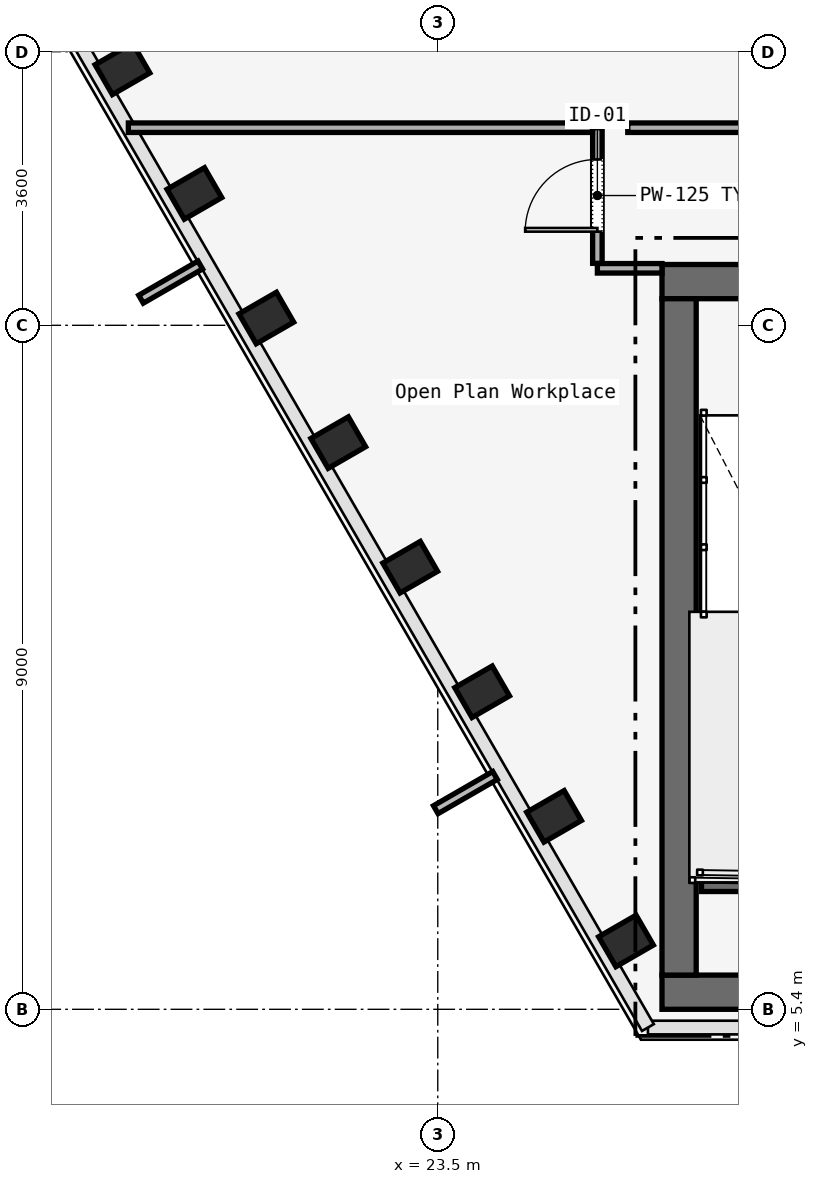
"""IFC4 building model, lengths in metres.
Left out: names, types, materials, properties, quantities, classifications, styles, units other than length and angle.
Written with IfcOpenShell. Run it as: python <this file> out.ifc"""

import sys

from ifc_helpers import new_model, si_unit, direction, frame, frame_2d, origin, origin_2d, place, context, subcontext, project, spatial, rectangle, i_section, extrude, element, fill, save


model = new_model("IFC4")
c1 = context("Model", 3, precision=1e-05, world=origin(), true_north=direction((0.0, 1.0)))
c2 = subcontext(c1, "Body", "Model", "MODEL_VIEW")
j1 = project(units=[si_unit("LENGTHUNIT", "METRE"), si_unit("PLANEANGLEUNIT", "RADIAN")], contexts=[c1])
p1 = place(None, origin())
s1 = spatial("IfcSite", under=j1, at=p1, CompositionType="ELEMENT")
p2 = place(p1, origin())
s2 = spatial("IfcBuilding", under=s1, at=p2, CompositionType="ELEMENT")
p3 = place(p2, frame((0.0, 0.0, 58.8)))
s3 = spatial("IfcBuildingStorey", under=s2, at=p3, CompositionType="ELEMENT", Elevation=58.8)
p4 = place(p3, frame((26.45, 14.975, 0.0), z_axis=(0.0, 0.0, 1.0), x_axis=(1.0, 0.0, 0.0)))
e1 = element("IfcWall", 1, at=p4, inside=s3, PredefinedType="SOLIDWALL", context=c2, shape_type="SweptSolid", body=[
    extrude(rectangle(XDim=31.1, YDim=0.45, at=frame_2d((15.55, 0.0))), origin(), (0.0, 0.0, 1.0), 3.58),
])
p5 = place(p4, frame((1.65, 0.0, 0.0)))
e2 = element("IfcOpeningElement", 2, at=p5, cuts=e1, PredefinedType="OPENING", context=c2, shape_type="SweptSolid", body=[
    extrude(rectangle(XDim=1.1, YDim=2.2, at=frame_2d((0.55, 1.1))), frame((0.0, 0.225, 0.0), z_axis=(0.0, -1.0, 0.0), x_axis=(1.0, 0.0, 0.0)), (0.0, 0.0, 1.0), 0.45),
])
p6 = place(p4, frame((13.65, 0.0, 0.0)))
e3 = element("IfcOpeningElement", 3, at=p6, cuts=e1, PredefinedType="OPENING", context=c2, shape_type="SweptSolid", body=[
    extrude(rectangle(XDim=1.1, YDim=2.2, at=frame_2d((0.55, 1.1))), frame((0.0, 0.225, 0.0), z_axis=(0.0, -1.0, 0.0), x_axis=(1.0, 0.0, 0.0)), (0.0, 0.0, 1.0), 0.45),
])
p7 = place(p4, frame((25.55, 0.0, 0.0)))
e4 = element("IfcOpeningElement", 4, at=p7, cuts=e1, PredefinedType="OPENING", context=c2, shape_type="SweptSolid", body=[
    extrude(rectangle(XDim=1.1, YDim=2.2, at=frame_2d((0.55, 1.1))), frame((0.0, 0.225, 0.0), z_axis=(0.0, -1.0, 0.0), x_axis=(1.0, 0.0, 0.0)), (0.0, 0.0, 1.0), 0.45),
])
p8 = place(p4, frame((10.7, 0.0, 0.0)))
e5 = element("IfcOpeningElement", 5, at=p8, cuts=e1, PredefinedType="OPENING", context=c2, shape_type="SweptSolid", body=[
    extrude(rectangle(XDim=1.4, YDim=2.2, at=frame_2d((0.7, 1.1))), frame((0.0, 0.225, 0.0), z_axis=(0.0, -1.0, 0.0), x_axis=(1.0, 0.0, 0.0)), (0.0, 0.0, 1.0), 0.45),
])
p9 = place(p4, frame((19.35, 0.0, 0.0)))
e6 = element("IfcOpeningElement", 6, at=p9, cuts=e1, PredefinedType="OPENING", context=c2, shape_type="SweptSolid", body=[
    extrude(rectangle(XDim=1.1, YDim=2.2, at=frame_2d((0.55, 1.1))), frame((0.0, 0.225, 0.0), z_axis=(0.0, -1.0, 0.0), x_axis=(1.0, 0.0, 0.0)), (0.0, 0.0, 1.0), 0.45),
])
p10 = place(p4, frame((21.4, 0.0, 0.0)))
e7 = element("IfcOpeningElement", 7, at=p10, cuts=e1, PredefinedType="OPENING", context=c2, shape_type="SweptSolid", body=[
    extrude(rectangle(XDim=0.9, YDim=2.1, at=frame_2d((0.45, 1.05))), frame((0.0, 0.225, 0.0), z_axis=(0.0, -1.0, 0.0), x_axis=(1.0, 0.0, 0.0)), (0.0, 0.0, 1.0), 0.45),
])
p11 = place(p4, frame((23.35, 0.0, 0.0)))
e8 = element("IfcOpeningElement", 8, at=p11, cuts=e1, PredefinedType="OPENING", context=c2, shape_type="SweptSolid", body=[
    extrude(rectangle(XDim=1.3, YDim=2.3, at=frame_2d((0.65, 1.15))), frame((0.0, 0.225, 0.0), z_axis=(0.0, -1.0, 0.0), x_axis=(1.0, 0.0, 0.0)), (0.0, 0.0, 1.0), 0.45),
])
p12 = place(p3, frame((26.45, 5.625, 0.0), z_axis=(0.0, 0.0, 1.0), x_axis=(1.0, 0.0, 0.0)))
e9 = element("IfcWall", 9, at=p12, inside=s3, PredefinedType="SOLIDWALL", context=c2, shape_type="SweptSolid", body=[
    extrude(rectangle(XDim=31.1, YDim=0.45, at=frame_2d((15.55, 0.0))), origin(), (0.0, 0.0, 1.0), 3.58),
])
p13 = place(p3, frame((26.675, 5.85, 0.0), z_axis=(0.0, 0.0, 1.0), x_axis=(0.0, 1.0, 0.0)))
e10 = element("IfcWall", 10, at=p13, inside=s3, PredefinedType="SOLIDWALL", context=c2, shape_type="SweptSolid", body=[
    extrude(rectangle(XDim=8.9, YDim=0.45, at=frame_2d((4.45, 0.0))), origin(), (0.0, 0.0, 1.0), 3.58),
])
for number, where, z_axis, x_axis in (
    (11, (19.352, 17.774, 0.0), (0.0, 0.0, 1.0), (-0.5, 0.866, 0.0)),
    (12, (20.298, 16.135, 0.0), (0.0, 0.0, 1.0), (-0.5, 0.866, 0.0)),
    (13, (21.244, 14.496, 0.0), (0.0, 0.0, 1.0), (-0.5, 0.866, 0.0)),
    (14, (22.191, 12.857, 0.0), (0.0, 0.0, 1.0), (-0.5, 0.866, 0.0)),
    (15, (23.137, 11.217, 0.0), (0.0, 0.0, 1.0), (-0.5, 0.866, 0.0)),
    (16, (24.084, 9.578, 0.0), (0.0, 0.0, 1.0), (-0.5, 0.866, 0.0)),
    (17, (25.03, 7.939, 0.0), (0.0, 0.0, 1.0), (-0.5, 0.866, 0.0)),
    (18, (25.977, 6.3, 0.0), (0.0, 0.0, 1.0), (-0.5, 0.866, 0.0)),
):
    element("IfcColumn", number, at=place(p3, frame(where, z_axis=z_axis, x_axis=x_axis)), inside=s3, PredefinedType="COLUMN", context=c2, shape_type="SweptSolid", body=[
        extrude(i_section(OverallWidth=0.454, OverallDepth=0.569, WebThickness=0.078, FlangeThickness=0.08, FilletRadius=0.015, at=origin_2d()), origin(), (0.0, 0.0, 1.0), 3.58),
    ])
p14 = place(p3, frame((26.97, 7.05, 0.0), z_axis=(0.0, 0.0, 1.0), x_axis=(1.0, 0.0, 0.0)))
e19 = element("IfcWall", 19, at=p14, inside=s3, PredefinedType="SOLIDWALL", context=c2, shape_type="SweptSolid", body=[
    extrude(rectangle(XDim=3.115, YDim=0.2, at=frame_2d((1.558, 0.0))), origin(), (0.0, 0.0, 1.0), 3.8),
])
p15 = place(p3, frame((26.45, 15.15, 0.0), z_axis=(0.0, 0.0, 1.0), x_axis=(-1.0, 0.0, 0.0)))
e20 = element("IfcWall", 20, at=p15, inside=s3, PredefinedType="PARTITIONING", context=c2, shape_type="SweptSolid", body=[
    extrude(rectangle(XDim=0.85, YDim=0.125, at=frame_2d((0.425, 0.0))), origin(), (0.0, 0.0, 1.0), 2.933),
])
p16 = place(p3, frame((25.6, 15.215, 0.0), z_axis=(0.0, 0.0, 1.0), x_axis=(0.0, 1.0, 0.0)))
e21 = element("IfcWall", 21, at=p16, inside=s3, PredefinedType="PARTITIONING", context=c2, shape_type="SweptSolid", body=[
    extrude(rectangle(XDim=1.785, YDim=0.125, at=frame_2d((0.893, 0.0))), origin(), (0.0, 0.0, 1.0), 2.933),
])
p17 = place(p16, frame((0.417, 0.0, 0.0)))
e22 = element("IfcOpeningElement", 22, at=p17, cuts=e21, PredefinedType="OPENING", context=c2, shape_type="SweptSolid", body=[
    extrude(rectangle(XDim=0.95, YDim=2.2, at=frame_2d((0.475, 1.1))), frame((0.0, 0.062, 0.0), z_axis=(0.0, -1.0, 0.0), x_axis=(1.0, 0.0, 0.0)), (0.0, 0.0, 1.0), 0.125),
])
p18 = place(p3, frame((26.0, 17.0, 0.0), z_axis=(0.0, 0.0, 1.0), x_axis=(1.0, 0.0, 0.0)))
e23 = element("IfcWall", 23, at=p18, inside=s3, PredefinedType="PARTITIONING", context=c2, shape_type="SweptSolid", body=[
    extrude(rectangle(XDim=3.8, YDim=0.125, at=frame_2d((1.9, 0.0))), origin(), (0.0, 0.0, 1.0), 2.933),
])
p19 = place(p3, frame((19.429, 17.0, 0.0), z_axis=(0.0, 0.0, 1.0), x_axis=(1.0, 0.0, 0.0)))
e24 = element("IfcWall", 24, at=p19, inside=s3, PredefinedType="PARTITIONING", context=c2, shape_type="SweptSolid", body=[
    extrude(rectangle(XDim=6.106, YDim=0.125, at=frame_2d((3.053, 0.0))), origin(), (0.0, 0.0, 1.0), 2.933),
])
p20 = place(p17, origin())
e25 = element("IfcDoor", 25, at=p20, inside=s3, OperationType="SINGLE_SWING_LEFT", PredefinedType="DOOR", context=c2, shape_type="SweptSolid", body=[
    extrude(rectangle(XDim=0.95, YDim=2.2, at=frame_2d((0.475, 1.1))), frame((0.0, 0.025, 0.0), z_axis=(0.0, -1.0, 0.0), x_axis=(1.0, 0.0, 0.0)), (0.0, 0.0, 1.0), 0.05),
])
fill(e22, e25)
save(model, sys.argv[1])
